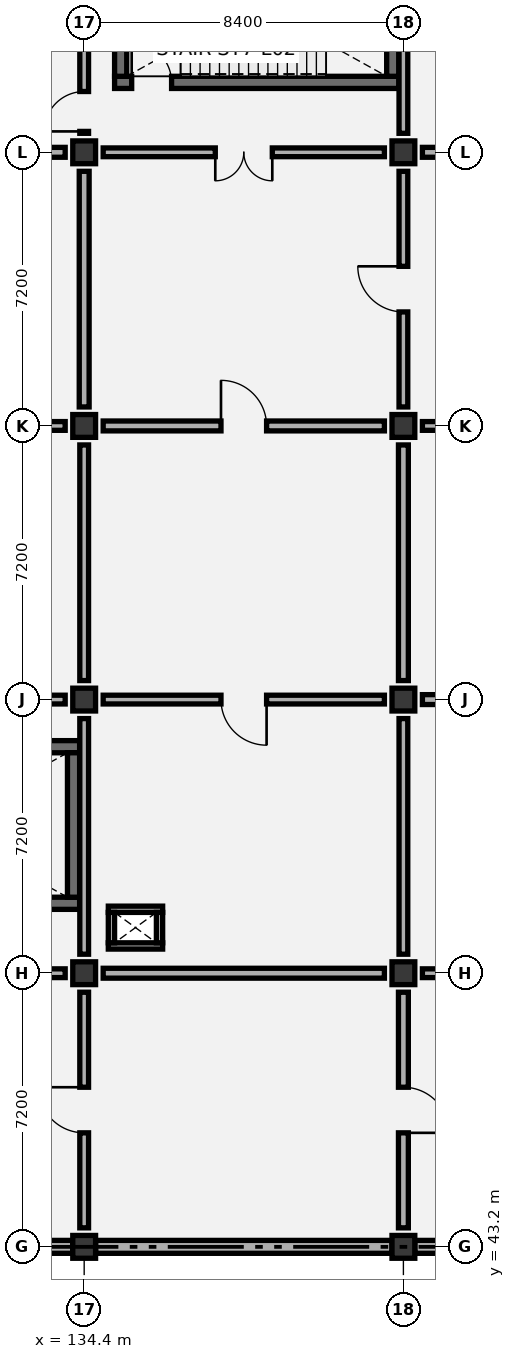
"""IFC4 building model, lengths in metres.
Left out: names, types, materials, properties, quantities, classifications, styles, units other than length and angle.
Written with IfcOpenShell. Run it as: python <this file> out.ifc"""

import sys

from ifc_helpers import new_model, si_unit, direction, frame, frame_2d, origin, origin_2d, place, context, subcontext, project, spatial, rectangle, extrude, element, fill, save


model = new_model("IFC4")
c1 = context("Model", 3, precision=1e-05, world=origin(), true_north=direction((0.0, 1.0)))
c2 = subcontext(c1, "Body", "Model", "MODEL_VIEW")
j1 = project(units=[si_unit("LENGTHUNIT", "METRE"), si_unit("PLANEANGLEUNIT", "RADIAN")], contexts=[c1])
p1 = place(None, origin())
s1 = spatial("IfcSite", under=j1, at=p1, CompositionType="ELEMENT")
p2 = place(p1, origin())
s2 = spatial("IfcBuilding", under=s1, at=p2, CompositionType="ELEMENT")
p3 = place(p2, frame((0.0, 0.0, 11.4)))
s3 = spatial("IfcBuildingStorey", under=s2, at=p3, CompositionType="ELEMENT", Elevation=11.4)
for number, where, z_axis, x_axis in (
    (1, (134.4, 43.2, 0.0), (0.0, 0.0, 1.0), (1.0, 0.0, 0.0)),
    (2, (134.4, 50.4, 0.0), (0.0, 0.0, 1.0), (1.0, 0.0, 0.0)),
    (3, (134.4, 57.6, 0.0), (0.0, 0.0, 1.0), (1.0, 0.0, 0.0)),
    (4, (134.4, 64.8, 0.0), (0.0, 0.0, 1.0), (1.0, 0.0, 0.0)),
    (5, (134.4, 72.0, 0.0), (0.0, 0.0, 1.0), (1.0, 0.0, 0.0)),
    (6, (142.8, 43.2, 0.0), (0.0, 0.0, 1.0), (1.0, 0.0, 0.0)),
    (7, (142.8, 50.4, 0.0), (0.0, 0.0, 1.0), (1.0, 0.0, 0.0)),
    (8, (142.8, 57.6, 0.0), (0.0, 0.0, 1.0), (1.0, 0.0, 0.0)),
    (9, (142.8, 64.8, 0.0), (0.0, 0.0, 1.0), (1.0, 0.0, 0.0)),
    (10, (142.8, 72.0, 0.0), (0.0, 0.0, 1.0), (1.0, 0.0, 0.0)),
):
    element("IfcColumn", number, at=place(p3, frame(where, z_axis=z_axis, x_axis=x_axis)), inside=s3, PredefinedType="COLUMN", context=c2, shape_type="SweptSolid", body=[
        extrude(rectangle(XDim=0.6, YDim=0.6, at=origin_2d()), origin(), (0.0, 0.0, 1.0), 5.4),
    ])
p4 = place(p3, frame((126.8, 52.24, 0.0), z_axis=(0.0, 0.0, 1.0), x_axis=(1.0, 0.0, 0.0)))
e11 = element("IfcWall", 11, at=p4, inside=s3, PredefinedType="SHEAR", context=c2, shape_type="SweptSolid", body=[
    extrude(rectangle(XDim=7.48, YDim=0.32, at=frame_2d((3.74, 0.0))), origin(), (0.0, 0.0, 1.0), 5.1),
])
p5 = place(p4, frame((0.45, 0.0, 0.0)))
e12 = element("IfcOpeningElement", 12, at=p5, cuts=e11, PredefinedType="OPENING", context=c2, shape_type="SweptSolid", body=[
    extrude(rectangle(XDim=1.05, YDim=2.15, at=frame_2d((0.525, 1.075))), frame((0.0, 0.17, 0.0), z_axis=(0.0, -1.0, 0.0), x_axis=(1.0, 0.0, 0.0)), (0.0, 0.0, 1.0), 0.34),
])
p6 = place(p3, frame((126.8, 56.36, 0.0), z_axis=(0.0, 0.0, 1.0), x_axis=(1.0, 0.0, 0.0)))
e13 = element("IfcWall", 13, at=p6, inside=s3, PredefinedType="SHEAR", context=c2, shape_type="SweptSolid", body=[
    extrude(rectangle(XDim=7.48, YDim=0.32, at=frame_2d((3.74, 0.0))), origin(), (0.0, 0.0, 1.0), 5.1),
])
p7 = place(p3, frame((134.12, 52.4, 0.0), z_axis=(0.0, 0.0, 1.0), x_axis=(0.0, 1.0, 0.0)))
e14 = element("IfcWall", 14, at=p7, inside=s3, PredefinedType="SHEAR", context=c2, shape_type="SweptSolid", body=[
    extrude(rectangle(XDim=3.8, YDim=0.32, at=frame_2d((1.9, 0.0))), origin(), (0.0, 0.0, 1.0), 5.1),
])
p8 = place(p3, frame((135.2, 73.84, 0.0), z_axis=(0.0, 0.0, 1.0), x_axis=(1.0, 0.0, 0.0)))
e15 = element("IfcWall", 15, at=p8, inside=s3, PredefinedType="SHEAR", context=c2, shape_type="SweptSolid", body=[
    extrude(rectangle(XDim=7.48, YDim=0.32, at=frame_2d((3.74, 0.0))), origin(), (0.0, 0.0, 1.0), 5.1),
])
p9 = place(p8, frame((0.45, 0.0, 0.0)))
e16 = element("IfcOpeningElement", 16, at=p9, cuts=e15, PredefinedType="OPENING", context=c2, shape_type="SweptSolid", body=[
    extrude(rectangle(XDim=1.05, YDim=2.15, at=frame_2d((0.525, 1.075))), frame((0.0, 0.17, 0.0), z_axis=(0.0, -1.0, 0.0), x_axis=(1.0, 0.0, 0.0)), (0.0, 0.0, 1.0), 0.34),
])
for number, where, z_axis, x_axis in (
    (17, (135.36, 74.0, 0.0), (0.0, 0.0, 1.0), (0.0, 1.0, 0.0)),
    (18, (142.52, 74.0, 0.0), (0.0, 0.0, 1.0), (0.0, 1.0, 0.0)),
):
    element("IfcWall", number, at=place(p3, frame(where, z_axis=z_axis, x_axis=x_axis)), inside=s3, PredefinedType="SHEAR", context=c2, shape_type="SweptSolid", body=[
        extrude(rectangle(XDim=3.8, YDim=0.32, at=frame_2d((1.9, 0.0))), origin(), (0.0, 0.0, 1.0), 5.1),
    ])
for number, where, z_axis, x_axis in (
    (19, (126.3, 43.2, 0.0), (0.0, 0.0, 1.0), (1.0, 0.0, 0.0)),
    (20, (134.7, 43.2, 0.0), (0.0, 0.0, 1.0), (1.0, 0.0, 0.0)),
):
    element("IfcWall", number, at=place(p3, frame(where, z_axis=z_axis, x_axis=x_axis)), inside=s3, PredefinedType="SOLIDWALL", context=c2, shape_type="SweptSolid", body=[
        extrude(rectangle(XDim=7.8, YDim=0.34, at=frame_2d((3.9, 0.0))), origin(), (0.0, 0.0, 1.0), 4.445),
    ])
p10 = place(p3, frame((143.1, 43.2, 0.0), z_axis=(0.0, 0.0, 1.0), x_axis=(1.0, 0.0, 0.0)))
e21 = element("IfcWall", 21, at=p10, inside=s3, PredefinedType="SOLIDWALL", context=c2, shape_type="SweptSolid", body=[
    extrude(rectangle(XDim=7.8, YDim=0.34, at=frame_2d((3.9, 0.0))), origin(), (0.0, 0.0, 1.0), 4.445),
])
for number, where, z_axis, x_axis in (
    (22, (135.035, 51.117, 0.0), (0.0, 0.0, 1.0), (1.0, 0.0, 0.0)),
    (23, (135.035, 52.083, 0.0), (0.0, 0.0, 1.0), (1.0, 0.0, 0.0)),
):
    element("IfcWall", number, at=place(p3, frame(where, z_axis=z_axis, x_axis=x_axis)), inside=s3, PredefinedType="PARTITIONING", context=c2, shape_type="SweptSolid", body=[
        extrude(rectangle(XDim=1.43, YDim=0.165, at=frame_2d((0.715, 0.0))), origin(), (0.0, 0.0, 1.0), 5.1),
    ])
for number, where, z_axis, x_axis in (
    (24, (135.117, 51.2, 0.0), (0.0, 0.0, 1.0), (0.0, 1.0, 0.0)),
    (25, (136.383, 51.2, 0.0), (0.0, 0.0, 1.0), (0.0, 1.0, 0.0)),
):
    element("IfcWall", number, at=place(p3, frame(where, z_axis=z_axis, x_axis=x_axis)), inside=s3, PredefinedType="PARTITIONING", context=c2, shape_type="SweptSolid", body=[
        extrude(rectangle(XDim=0.8, YDim=0.165, at=frame_2d((0.4, 0.0))), origin(), (0.0, 0.0, 1.0), 5.1),
    ])
p11 = place(p3, frame((134.4, 43.7, 0.0), z_axis=(0.0, 0.0, 1.0), x_axis=(0.0, 1.0, 0.0)))
e26 = element("IfcWall", 26, at=p11, inside=s3, PredefinedType="PARTITIONING", context=c2, shape_type="SweptSolid", body=[
    extrude(rectangle(XDim=6.2, YDim=0.23, at=frame_2d((3.1, 0.0))), origin(), (0.0, 0.0, 1.0), 4.695),
])
p12 = place(p11, frame((2.5, 0.0, 0.0)))
e27 = element("IfcOpeningElement", 27, at=p12, cuts=e26, PredefinedType="OPENING", context=c2, shape_type="SweptSolid", body=[
    extrude(rectangle(XDim=1.2, YDim=2.1, at=frame_2d((0.6, 1.05))), frame((0.0, 0.125, 0.0), z_axis=(0.0, -1.0, 0.0), x_axis=(1.0, 0.0, 0.0)), (0.0, 0.0, 1.0), 0.25),
])
p13 = place(p3, frame((126.5, 50.4, 0.0), z_axis=(0.0, 0.0, 1.0), x_axis=(1.0, 0.0, 0.0)))
e28 = element("IfcWall", 28, at=p13, inside=s3, PredefinedType="PARTITIONING", context=c2, shape_type="SweptSolid", body=[
    extrude(rectangle(XDim=7.4, YDim=0.23, at=frame_2d((3.7, 0.0))), origin(), (0.0, 0.0, 1.0), 4.345),
])
p14 = place(p13, frame((2.95, 0.0, 0.0)))
e29 = element("IfcOpeningElement", 29, at=p14, cuts=e28, PredefinedType="OPENING", context=c2, shape_type="SweptSolid", body=[
    extrude(rectangle(XDim=1.5, YDim=2.15, at=frame_2d((0.75, 1.075))), frame((0.0, 0.125, 0.0), z_axis=(0.0, -1.0, 0.0), x_axis=(1.0, 0.0, 0.0)), (0.0, 0.0, 1.0), 0.25),
])
p15 = place(p3, frame((134.4, 50.9, 0.0), z_axis=(0.0, 0.0, 1.0), x_axis=(0.0, 1.0, 0.0)))
e30 = element("IfcWall", 30, at=p15, inside=s3, PredefinedType="PARTITIONING", context=c2, shape_type="SweptSolid", body=[
    extrude(rectangle(XDim=6.2, YDim=0.23, at=frame_2d((3.1, 0.0))), origin(), (0.0, 0.0, 1.0), 4.395),
])
p16 = place(p3, frame((126.5, 57.6, 0.0), z_axis=(0.0, 0.0, 1.0), x_axis=(1.0, 0.0, 0.0)))
e31 = element("IfcWall", 31, at=p16, inside=s3, PredefinedType="PARTITIONING", context=c2, shape_type="SweptSolid", body=[
    extrude(rectangle(XDim=7.4, YDim=0.23, at=frame_2d((3.7, 0.0))), origin(), (0.0, 0.0, 1.0), 4.345),
])
p17 = place(p3, frame((134.4, 58.1, 0.0), z_axis=(0.0, 0.0, 1.0), x_axis=(0.0, 1.0, 0.0)))
e32 = element("IfcWall", 32, at=p17, inside=s3, PredefinedType="PARTITIONING", context=c2, shape_type="SweptSolid", body=[
    extrude(rectangle(XDim=6.2, YDim=0.23, at=frame_2d((3.1, 0.0))), origin(), (0.0, 0.0, 1.0), 4.805),
])
p18 = place(p3, frame((126.5, 64.8, 0.0), z_axis=(0.0, 0.0, 1.0), x_axis=(1.0, 0.0, 0.0)))
e33 = element("IfcWall", 33, at=p18, inside=s3, PredefinedType="PARTITIONING", context=c2, shape_type="SweptSolid", body=[
    extrude(rectangle(XDim=7.4, YDim=0.23, at=frame_2d((3.7, 0.0))), origin(), (0.0, 0.0, 1.0), 4.345),
])
p19 = place(p18, frame((3.1, 0.0, 0.0)))
e34 = element("IfcOpeningElement", 34, at=p19, cuts=e33, PredefinedType="OPENING", context=c2, shape_type="SweptSolid", body=[
    extrude(rectangle(XDim=1.2, YDim=2.1, at=frame_2d((0.6, 1.05))), frame((0.0, 0.125, 0.0), z_axis=(0.0, -1.0, 0.0), x_axis=(1.0, 0.0, 0.0)), (0.0, 0.0, 1.0), 0.25),
])
p20 = place(p3, frame((134.4, 65.3, 0.0), z_axis=(0.0, 0.0, 1.0), x_axis=(0.0, 1.0, 0.0)))
e35 = element("IfcWall", 35, at=p20, inside=s3, PredefinedType="PARTITIONING", context=c2, shape_type="SweptSolid", body=[
    extrude(rectangle(XDim=6.2, YDim=0.26, at=frame_2d((3.1, 0.0))), origin(), (0.0, 0.0, 1.0), 4.395),
])
p21 = place(p3, frame((126.5, 72.0, 0.0), z_axis=(0.0, 0.0, 1.0), x_axis=(1.0, 0.0, 0.0)))
e36 = element("IfcWall", 36, at=p21, inside=s3, PredefinedType="PARTITIONING", context=c2, shape_type="SweptSolid", body=[
    extrude(rectangle(XDim=7.4, YDim=0.26, at=frame_2d((3.7, 0.0))), origin(), (0.0, 0.0, 1.0), 4.345),
])
p22 = place(p21, frame((3.1, 0.0, 0.0)))
e37 = element("IfcOpeningElement", 37, at=p22, cuts=e36, PredefinedType="OPENING", context=c2, shape_type="SweptSolid", body=[
    extrude(rectangle(XDim=1.2, YDim=2.1, at=frame_2d((0.6, 1.05))), frame((0.0, 0.14, 0.0), z_axis=(0.0, -1.0, 0.0), x_axis=(1.0, 0.0, 0.0)), (0.0, 0.0, 1.0), 0.28),
])
p23 = place(p3, frame((134.4, 72.5, 0.0), z_axis=(0.0, 0.0, 1.0), x_axis=(0.0, 1.0, 0.0)))
e38 = element("IfcWall", 38, at=p23, inside=s3, PredefinedType="PARTITIONING", context=c2, shape_type="SweptSolid", body=[
    extrude(rectangle(XDim=6.2, YDim=0.23, at=frame_2d((3.1, 0.0))), origin(), (0.0, 0.0, 1.0), 4.595),
])
p24 = place(p23, frame((0.05, 0.0, 0.0)))
e39 = element("IfcOpeningElement", 39, at=p24, cuts=e38, PredefinedType="OPENING", context=c2, shape_type="SweptSolid", body=[
    extrude(rectangle(XDim=1.05, YDim=2.15, at=frame_2d((0.525, 1.075))), frame((0.0, 0.125, 0.0), z_axis=(0.0, -1.0, 0.0), x_axis=(1.0, 0.0, 0.0)), (0.0, 0.0, 1.0), 0.25),
])
p25 = place(p3, frame((142.8, 43.7, 0.0), z_axis=(0.0, 0.0, 1.0), x_axis=(0.0, 1.0, 0.0)))
e40 = element("IfcWall", 40, at=p25, inside=s3, PredefinedType="PARTITIONING", context=c2, shape_type="SweptSolid", body=[
    extrude(rectangle(XDim=6.2, YDim=0.26, at=frame_2d((3.1, 0.0))), origin(), (0.0, 0.0, 1.0), 4.395),
])
p26 = place(p25, frame((2.5, 0.0, 0.0)))
e41 = element("IfcOpeningElement", 41, at=p26, cuts=e40, PredefinedType="OPENING", context=c2, shape_type="SweptSolid", body=[
    extrude(rectangle(XDim=1.2, YDim=2.1, at=frame_2d((0.6, 1.05))), frame((0.0, 0.14, 0.0), z_axis=(0.0, -1.0, 0.0), x_axis=(1.0, 0.0, 0.0)), (0.0, 0.0, 1.0), 0.28),
])
p27 = place(p3, frame((134.9, 50.4, 0.0), z_axis=(0.0, 0.0, 1.0), x_axis=(1.0, 0.0, 0.0)))
e42 = element("IfcWall", 42, at=p27, inside=s3, PredefinedType="PARTITIONING", context=c2, shape_type="SweptSolid", body=[
    extrude(rectangle(XDim=7.4, YDim=0.26, at=frame_2d((3.7, 0.0))), origin(), (0.0, 0.0, 1.0), 4.345),
])
p28 = place(p3, frame((142.8, 50.9, 0.0), z_axis=(0.0, 0.0, 1.0), x_axis=(0.0, 1.0, 0.0)))
e43 = element("IfcWall", 43, at=p28, inside=s3, PredefinedType="PARTITIONING", context=c2, shape_type="SweptSolid", body=[
    extrude(rectangle(XDim=6.2, YDim=0.23, at=frame_2d((3.1, 0.0))), origin(), (0.0, 0.0, 1.0), 4.805),
])
p29 = place(p3, frame((134.9, 57.6, 0.0), z_axis=(0.0, 0.0, 1.0), x_axis=(1.0, 0.0, 0.0)))
e44 = element("IfcWall", 44, at=p29, inside=s3, PredefinedType="PARTITIONING", context=c2, shape_type="SweptSolid", body=[
    extrude(rectangle(XDim=7.4, YDim=0.23, at=frame_2d((3.7, 0.0))), origin(), (0.0, 0.0, 1.0), 4.345),
])
p30 = place(p29, frame((3.1, 0.0, 0.0)))
e45 = element("IfcOpeningElement", 45, at=p30, cuts=e44, PredefinedType="OPENING", context=c2, shape_type="SweptSolid", body=[
    extrude(rectangle(XDim=1.2, YDim=2.1, at=frame_2d((0.6, 1.05))), frame((0.0, 0.125, 0.0), z_axis=(0.0, -1.0, 0.0), x_axis=(1.0, 0.0, 0.0)), (0.0, 0.0, 1.0), 0.25),
])
p31 = place(p3, frame((142.8, 58.1, 0.0), z_axis=(0.0, 0.0, 1.0), x_axis=(0.0, 1.0, 0.0)))
e46 = element("IfcWall", 46, at=p31, inside=s3, PredefinedType="PARTITIONING", context=c2, shape_type="SweptSolid", body=[
    extrude(rectangle(XDim=6.2, YDim=0.26, at=frame_2d((3.1, 0.0))), origin(), (0.0, 0.0, 1.0), 4.395),
])
p32 = place(p3, frame((134.9, 64.8, 0.0), z_axis=(0.0, 0.0, 1.0), x_axis=(1.0, 0.0, 0.0)))
e47 = element("IfcWall", 47, at=p32, inside=s3, PredefinedType="PARTITIONING", context=c2, shape_type="SweptSolid", body=[
    extrude(rectangle(XDim=7.4, YDim=0.26, at=frame_2d((3.7, 0.0))), origin(), (0.0, 0.0, 1.0), 4.345),
])
p33 = place(p32, frame((3.1, 0.0, 0.0)))
e48 = element("IfcOpeningElement", 48, at=p33, cuts=e47, PredefinedType="OPENING", context=c2, shape_type="SweptSolid", body=[
    extrude(rectangle(XDim=1.2, YDim=2.1, at=frame_2d((0.6, 1.05))), frame((0.0, 0.14, 0.0), z_axis=(0.0, -1.0, 0.0), x_axis=(1.0, 0.0, 0.0)), (0.0, 0.0, 1.0), 0.28),
])
p34 = place(p3, frame((142.8, 65.3, 0.0), z_axis=(0.0, 0.0, 1.0), x_axis=(0.0, 1.0, 0.0)))
e49 = element("IfcWall", 49, at=p34, inside=s3, PredefinedType="PARTITIONING", context=c2, shape_type="SweptSolid", body=[
    extrude(rectangle(XDim=6.2, YDim=0.23, at=frame_2d((3.1, 0.0))), origin(), (0.0, 0.0, 1.0), 4.595),
])
p35 = place(p34, frame((2.5, 0.0, 0.0)))
e50 = element("IfcOpeningElement", 50, at=p35, cuts=e49, PredefinedType="OPENING", context=c2, shape_type="SweptSolid", body=[
    extrude(rectangle(XDim=1.2, YDim=2.1, at=frame_2d((0.6, 1.05))), frame((0.0, 0.125, 0.0), z_axis=(0.0, -1.0, 0.0), x_axis=(1.0, 0.0, 0.0)), (0.0, 0.0, 1.0), 0.25),
])
p36 = place(p3, frame((134.9, 72.0, 0.0), z_axis=(0.0, 0.0, 1.0), x_axis=(1.0, 0.0, 0.0)))
e51 = element("IfcWall", 51, at=p36, inside=s3, PredefinedType="PARTITIONING", context=c2, shape_type="SweptSolid", body=[
    extrude(rectangle(XDim=7.4, YDim=0.23, at=frame_2d((3.7, 0.0))), origin(), (0.0, 0.0, 1.0), 4.345),
])
p37 = place(p36, frame((2.95, 0.0, 0.0)))
e52 = element("IfcOpeningElement", 52, at=p37, cuts=e51, PredefinedType="OPENING", context=c2, shape_type="SweptSolid", body=[
    extrude(rectangle(XDim=1.5, YDim=2.15, at=frame_2d((0.75, 1.075))), frame((0.0, 0.125, 0.0), z_axis=(0.0, -1.0, 0.0), x_axis=(1.0, 0.0, 0.0)), (0.0, 0.0, 1.0), 0.25),
])
p38 = place(p3, frame((142.8, 72.5, 0.0), z_axis=(0.0, 0.0, 1.0), x_axis=(0.0, 1.0, 0.0)))
e53 = element("IfcWall", 53, at=p38, inside=s3, PredefinedType="PARTITIONING", context=c2, shape_type="SweptSolid", body=[
    extrude(rectangle(XDim=6.2, YDim=0.23, at=frame_2d((3.1, 0.0))), origin(), (0.0, 0.0, 1.0), 4.395),
])
p39 = place(p3, frame((143.3, 50.4, 0.0), z_axis=(0.0, 0.0, 1.0), x_axis=(1.0, 0.0, 0.0)))
e54 = element("IfcWall", 54, at=p39, inside=s3, PredefinedType="PARTITIONING", context=c2, shape_type="SweptSolid", body=[
    extrude(rectangle(XDim=7.4, YDim=0.23, at=frame_2d((3.7, 0.0))), origin(), (0.0, 0.0, 1.0), 4.345),
])
p40 = place(p3, frame((143.3, 57.6, 0.0), z_axis=(0.0, 0.0, 1.0), x_axis=(1.0, 0.0, 0.0)))
e55 = element("IfcWall", 55, at=p40, inside=s3, PredefinedType="PARTITIONING", context=c2, shape_type="SweptSolid", body=[
    extrude(rectangle(XDim=7.4, YDim=0.26, at=frame_2d((3.7, 0.0))), origin(), (0.0, 0.0, 1.0), 4.345),
])
p41 = place(p40, frame((3.1, 0.0, 0.0)))
e56 = element("IfcOpeningElement", 56, at=p41, cuts=e55, PredefinedType="OPENING", context=c2, shape_type="SweptSolid", body=[
    extrude(rectangle(XDim=1.2, YDim=2.1, at=frame_2d((0.6, 1.05))), frame((0.0, 0.14, 0.0), z_axis=(0.0, -1.0, 0.0), x_axis=(1.0, 0.0, 0.0)), (0.0, 0.0, 1.0), 0.28),
])
p42 = place(p3, frame((143.3, 64.8, 0.0), z_axis=(0.0, 0.0, 1.0), x_axis=(1.0, 0.0, 0.0)))
e57 = element("IfcWall", 57, at=p42, inside=s3, PredefinedType="PARTITIONING", context=c2, shape_type="SweptSolid", body=[
    extrude(rectangle(XDim=7.4, YDim=0.23, at=frame_2d((3.7, 0.0))), origin(), (0.0, 0.0, 1.0), 4.345),
])
p43 = place(p42, frame((3.1, 0.0, 0.0)))
e58 = element("IfcOpeningElement", 58, at=p43, cuts=e57, PredefinedType="OPENING", context=c2, shape_type="SweptSolid", body=[
    extrude(rectangle(XDim=1.2, YDim=2.1, at=frame_2d((0.6, 1.05))), frame((0.0, 0.125, 0.0), z_axis=(0.0, -1.0, 0.0), x_axis=(1.0, 0.0, 0.0)), (0.0, 0.0, 1.0), 0.25),
])
p44 = place(p3, frame((143.3, 72.0, 0.0), z_axis=(0.0, 0.0, 1.0), x_axis=(1.0, 0.0, 0.0)))
e59 = element("IfcWall", 59, at=p44, inside=s3, PredefinedType="PARTITIONING", context=c2, shape_type="SweptSolid", body=[
    extrude(rectangle(XDim=7.4, YDim=0.26, at=frame_2d((3.7, 0.0))), origin(), (0.0, 0.0, 1.0), 4.345),
])
p45 = place(p44, frame((3.1, 0.0, 0.0)))
e60 = element("IfcOpeningElement", 60, at=p45, cuts=e59, PredefinedType="OPENING", context=c2, shape_type="SweptSolid", body=[
    extrude(rectangle(XDim=1.2, YDim=2.1, at=frame_2d((0.6, 1.05))), frame((0.0, 0.14, 0.0), z_axis=(0.0, -1.0, 0.0), x_axis=(1.0, 0.0, 0.0)), (0.0, 0.0, 1.0), 0.28),
])
p46 = place(p9, origin())
e61 = element("IfcDoor", 61, at=p46, inside=s3, OperationType="SINGLE_SWING_LEFT", PredefinedType="DOOR", context=c2, shape_type="SweptSolid", body=[
    extrude(rectangle(XDim=1.05, YDim=2.15, at=frame_2d((0.525, 1.075))), frame((0.0, 0.025, 0.0), z_axis=(0.0, -1.0, 0.0), x_axis=(1.0, 0.0, 0.0)), (0.0, 0.0, 1.0), 0.05),
])
fill(e16, e61)
p47 = place(p12, origin())
e62 = element("IfcDoor", 62, at=p47, inside=s3, OperationType="SINGLE_SWING_RIGHT", PredefinedType="DOOR", context=c2, shape_type="SweptSolid", body=[
    extrude(rectangle(XDim=1.2, YDim=2.1, at=frame_2d((0.6, 1.05))), frame((0.0, 0.025, 0.0), z_axis=(0.0, -1.0, 0.0), x_axis=(1.0, 0.0, 0.0)), (0.0, 0.0, 1.0), 0.05),
])
fill(e27, e62)
p48 = place(p24, origin())
e63 = element("IfcDoor", 63, at=p48, inside=s3, OperationType="SINGLE_SWING_LEFT", PredefinedType="DOOR", context=c2, shape_type="SweptSolid", body=[
    extrude(rectangle(XDim=1.05, YDim=2.15, at=frame_2d((0.525, 1.075))), frame((0.0, 0.025, 0.0), z_axis=(0.0, -1.0, 0.0), x_axis=(1.0, 0.0, 0.0)), (0.0, 0.0, 1.0), 0.05),
])
fill(e39, e63)
p49 = place(p26, frame((1.2, 0.0, 0.0), z_axis=(0.0, 0.0, 1.0), x_axis=(-1.0, 0.0, 0.0)))
e64 = element("IfcDoor", 64, at=p49, inside=s3, OperationType="SINGLE_SWING_RIGHT", PredefinedType="DOOR", context=c2, shape_type="SweptSolid", body=[
    extrude(rectangle(XDim=1.2, YDim=2.1, at=frame_2d((0.6, 1.05))), frame((0.0, 0.025, 0.0), z_axis=(0.0, -1.0, 0.0), x_axis=(1.0, 0.0, 0.0)), (0.0, 0.0, 1.0), 0.05),
])
fill(e41, e64)
p50 = place(p30, frame((1.2, 0.0, 0.0), z_axis=(0.0, 0.0, 1.0), x_axis=(-1.0, 0.0, 0.0)))
e65 = element("IfcDoor", 65, at=p50, inside=s3, OperationType="SINGLE_SWING_LEFT", PredefinedType="DOOR", context=c2, shape_type="SweptSolid", body=[
    extrude(rectangle(XDim=1.2, YDim=2.1, at=frame_2d((0.6, 1.05))), frame((0.0, 0.025, 0.0), z_axis=(0.0, -1.0, 0.0), x_axis=(1.0, 0.0, 0.0)), (0.0, 0.0, 1.0), 0.05),
])
fill(e45, e65)
p51 = place(p33, origin())
e66 = element("IfcDoor", 66, at=p51, inside=s3, OperationType="SINGLE_SWING_LEFT", PredefinedType="DOOR", context=c2, shape_type="SweptSolid", body=[
    extrude(rectangle(XDim=1.2, YDim=2.1, at=frame_2d((0.6, 1.05))), frame((0.0, 0.025, 0.0), z_axis=(0.0, -1.0, 0.0), x_axis=(1.0, 0.0, 0.0)), (0.0, 0.0, 1.0), 0.05),
])
fill(e48, e66)
p52 = place(p35, origin())
e67 = element("IfcDoor", 67, at=p52, inside=s3, OperationType="SINGLE_SWING_RIGHT", PredefinedType="DOOR", context=c2, shape_type="SweptSolid", body=[
    extrude(rectangle(XDim=1.2, YDim=2.1, at=frame_2d((0.6, 1.05))), frame((0.0, 0.025, 0.0), z_axis=(0.0, -1.0, 0.0), x_axis=(1.0, 0.0, 0.0)), (0.0, 0.0, 1.0), 0.05),
])
fill(e50, e67)
p53 = place(p37, frame((1.5, 0.0, 0.0), z_axis=(0.0, 0.0, 1.0), x_axis=(-1.0, 0.0, 0.0)))
e68 = element("IfcDoor", 68, at=p53, inside=s3, OperationType="DOUBLE_DOOR_SINGLE_SWING", PredefinedType="DOOR", context=c2, shape_type="SweptSolid", body=[
    extrude(rectangle(XDim=1.5, YDim=2.15, at=frame_2d((0.75, 1.075))), frame((0.0, 0.025, 0.0), z_axis=(0.0, -1.0, 0.0), x_axis=(1.0, 0.0, 0.0)), (0.0, 0.0, 1.0), 0.05),
])
fill(e52, e68)
save(model, sys.argv[1])
